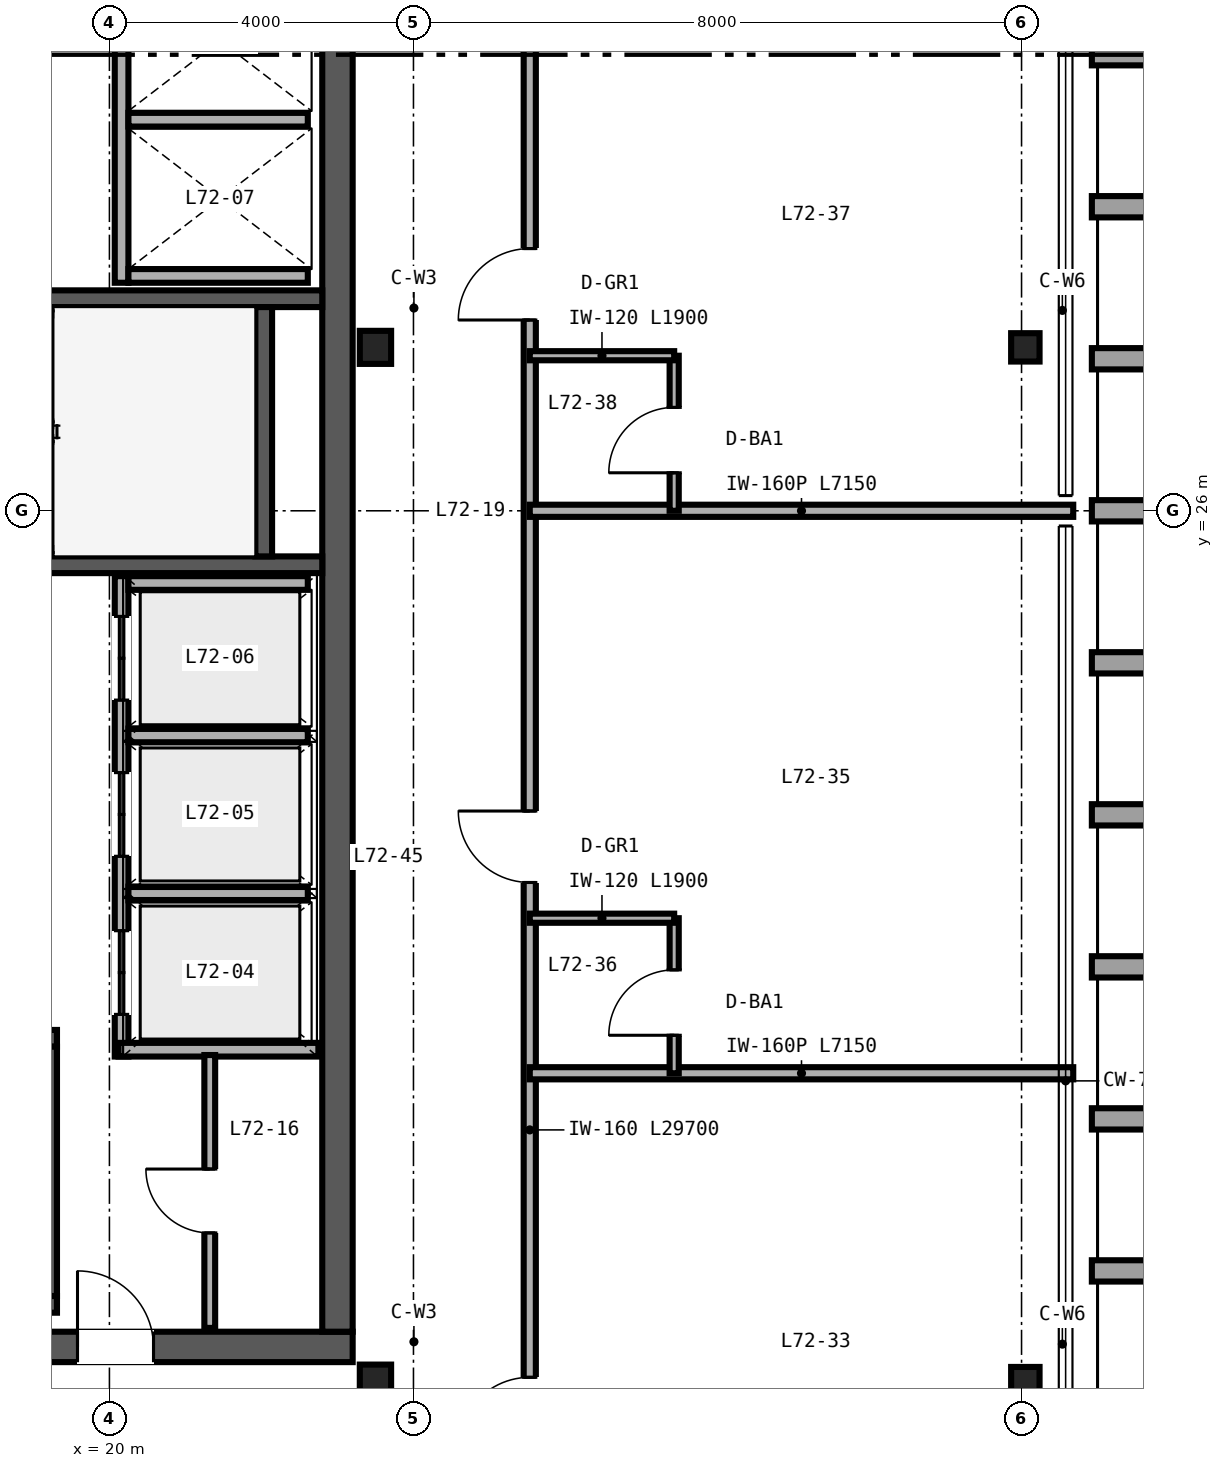
"""IFC4 building model, lengths in metres.
Left out: names, types, materials, properties, quantities, classifications, styles, units other than length and angle.
Written with IfcOpenShell. Run it as: python <this file> out.ifc"""

import sys

from ifc_helpers import new_model, si_unit, direction, frame, frame_2d, origin, origin_2d, place, context, subcontext, project, spatial, rectangle, i_section, extrude, source, transform, mapped, element, fill, save


model = new_model("IFC4")
c1 = context("Model", 3, precision=1e-05, world=origin(), true_north=direction((0.0, 1.0)))
c2 = subcontext(c1, "Body", "Model", "MODEL_VIEW")
j1 = project(units=[si_unit("LENGTHUNIT", "METRE"), si_unit("PLANEANGLEUNIT", "RADIAN")], contexts=[c1])
p1 = place(None, origin())
s1 = spatial("IfcSite", under=j1, at=p1, CompositionType="ELEMENT")
p2 = place(p1, origin())
s2 = spatial("IfcBuilding", under=s1, at=p2, CompositionType="ELEMENT")
p3 = place(p2, frame((0.0, 0.0, 283.2)))
s3 = spatial("IfcBuildingStorey", under=s2, at=p3, CompositionType="ELEMENT", Elevation=283.2)
p4 = place(p3, frame((10.8, 15.0, 0.0), z_axis=(0.0, 0.0, 1.0), x_axis=(1.0, 0.0, 0.0)))
e1 = element("IfcWall", 1, at=p4, inside=s3, PredefinedType="SHEAR", context=c2, shape_type="SweptSolid", body=[
    extrude(rectangle(XDim=12.4, YDim=0.4, at=frame_2d((6.2, 0.0))), origin(), (0.0, 0.0, 1.0), 3.38),
])
p5 = place(p4, frame((8.78, 0.0, 0.0)))
e2 = element("IfcOpeningElement", 2, at=p5, cuts=e1, PredefinedType="OPENING", context=c2, shape_type="SweptSolid", body=[
    extrude(rectangle(XDim=1.0, YDim=2.15, at=frame_2d((0.5, 1.075))), frame((0.0, 0.21, 0.0), z_axis=(0.0, -1.0, 0.0), x_axis=(1.0, 0.0, 0.0)), (0.0, 0.0, 1.0), 0.42),
])
p6 = place(p3, frame((23.0, 15.2, 0.0), z_axis=(0.0, 0.0, 1.0), x_axis=(0.0, 1.0, 0.0)))
e3 = element("IfcWall", 3, at=p6, inside=s3, PredefinedType="SHEAR", context=c2, shape_type="SweptSolid", body=[
    extrude(rectangle(XDim=21.6, YDim=0.4, at=frame_2d((10.8, 0.0))), origin(), (0.0, 0.0, 1.0), 3.38),
])
p7 = place(p3, frame((11.2, 15.56, 0.0), z_axis=(0.0, 0.0, 1.0), x_axis=(1.0, 0.0, 0.0)))
e4 = element("IfcWall", 4, at=p7, inside=s3, PredefinedType="SHEAR", context=c2, shape_type="SweptSolid", body=[
    extrude(rectangle(XDim=8.11, YDim=0.22, at=frame_2d((4.055, 0.0))), origin(), (0.0, 0.0, 1.0), 3.4),
])
p8 = place(p3, frame((11.2, 19.06, 0.0), z_axis=(0.0, 0.0, 1.0), x_axis=(1.0, 0.0, 0.0)))
e5 = element("IfcWall", 5, at=p8, inside=s3, PredefinedType="SHEAR", context=c2, shape_type="SweptSolid", body=[
    extrude(rectangle(XDim=8.11, YDim=0.22, at=frame_2d((4.055, 0.0))), origin(), (0.0, 0.0, 1.0), 3.4),
])
p9 = place(p8, frame((0.72, 0.0, 0.0)))
e6 = element("IfcOpeningElement", 6, at=p9, cuts=e5, PredefinedType="OPENING", context=c2, shape_type="SweptSolid", body=[
    extrude(rectangle(XDim=1.05, YDim=2.15, at=frame_2d((0.525, 1.075))), frame((0.0, 0.12, 0.0), z_axis=(0.0, -1.0, 0.0), x_axis=(1.0, 0.0, 0.0)), (0.0, 0.0, 1.0), 0.24),
])
p10 = place(p3, frame((19.2, 15.67, 0.0), z_axis=(0.0, 0.0, 1.0), x_axis=(0.0, 1.0, 0.0)))
e7 = element("IfcWall", 7, at=p10, inside=s3, PredefinedType="SHEAR", context=c2, shape_type="SweptSolid", body=[
    extrude(rectangle(XDim=3.28, YDim=0.22, at=frame_2d((1.64, 0.0))), origin(), (0.0, 0.0, 1.0), 3.4),
])
p11 = place(p3, frame((14.18, 25.29, 0.0), z_axis=(0.0, 0.0, 1.0), x_axis=(1.0, 0.0, 0.0)))
e8 = element("IfcWall", 8, at=p11, inside=s3, PredefinedType="SHEAR", context=c2, shape_type="SweptSolid", body=[
    extrude(rectangle(XDim=8.62, YDim=0.22, at=frame_2d((4.31, 0.0))), origin(), (0.0, 0.0, 1.0), 3.4),
])
p12 = place(p11, frame((0.47, 0.0, 0.0)))
e9 = element("IfcOpeningElement", 9, at=p12, cuts=e8, PredefinedType="OPENING", context=c2, shape_type="SweptSolid", body=[
    extrude(rectangle(XDim=1.05, YDim=2.15, at=frame_2d((0.525, 1.075))), frame((0.0, 0.12, 0.0), z_axis=(0.0, -1.0, 0.0), x_axis=(1.0, 0.0, 0.0)), (0.0, 0.0, 1.0), 0.24),
])
p13 = place(p3, frame((14.18, 28.79, 0.0), z_axis=(0.0, 0.0, 1.0), x_axis=(1.0, 0.0, 0.0)))
e10 = element("IfcWall", 10, at=p13, inside=s3, PredefinedType="SHEAR", context=c2, shape_type="SweptSolid", body=[
    extrude(rectangle(XDim=8.62, YDim=0.22, at=frame_2d((4.31, 0.0))), origin(), (0.0, 0.0, 1.0), 3.4),
])
p14 = place(p3, frame((22.03, 25.4, 0.0), z_axis=(0.0, 0.0, 1.0), x_axis=(0.0, 1.0, 0.0)))
e11 = element("IfcWall", 11, at=p14, inside=s3, PredefinedType="SHEAR", context=c2, shape_type="SweptSolid", body=[
    extrude(rectangle(XDim=3.28, YDim=0.22, at=frame_2d((1.64, 0.0))), origin(), (0.0, 0.0, 1.0), 3.4),
])
m1 = source(origin(), c2, "Body", "SweptSolid", [
    extrude(i_section(OverallWidth=0.412, OverallDepth=0.435, WebThickness=0.036, FlangeThickness=0.057, FilletRadius=0.025, at=origin_2d()), origin(), (0.0, 0.0, 1.0), 3.38),
])
for number, where, z_axis, x_axis in (
    (12, (23.5, 14.55, 0.0), (0.0, 0.0, 1.0), (1.0, 0.0, 0.0)),
    (13, (23.5, 28.15, 0.0), (0.0, 0.0, 1.0), (1.0, 0.0, 0.0)),
):
    element("IfcColumn", number, at=place(p3, frame(where, z_axis=z_axis, x_axis=x_axis)), inside=s3, PredefinedType="COLUMN", context=c2, shape_type="MappedRepresentation", body=[
        mapped(m1, transform((0.0, 0.0, 0.0), scale=1.0)),
    ])
m2 = source(origin(), c2, "Body", "SweptSolid", [
    extrude(i_section(OverallWidth=0.374, OverallDepth=0.373, WebThickness=0.016, FlangeThickness=0.026, FilletRadius=0.025, at=origin_2d()), origin(), (0.0, 0.0, 1.0), 3.38),
])
for number, where, z_axis, x_axis in (
    (14, (32.05, 14.55, 0.0), (0.0, 0.0, 1.0), (1.0, 0.0, 0.0)),
    (15, (32.05, 28.15, 0.0), (0.0, 0.0, 1.0), (1.0, 0.0, 0.0)),
):
    element("IfcColumn", number, at=place(p3, frame(where, z_axis=z_axis, x_axis=x_axis)), inside=s3, PredefinedType="COLUMN", context=c2, shape_type="MappedRepresentation", body=[
        mapped(m2, transform((0.0, 0.0, 0.0), scale=1.0)),
    ])
p15 = place(p3, frame((20.16, 18.82, 0.0), z_axis=(0.0, 0.0, 1.0), x_axis=(0.0, 1.0, 0.0)))
e16 = element("IfcWall", 16, at=p15, inside=s3, PredefinedType="SOLIDWALL", context=c2, shape_type="SweptSolid", body=[
    extrude(rectangle(XDim=6.32, YDim=0.18, at=frame_2d((3.16, 0.0))), origin(), (0.0, 0.0, 1.0), 2.48),
])
p16 = place(p15, frame((0.555, 0.0, 0.0)))
e17 = element("IfcOpeningElement", 17, at=p16, cuts=e16, PredefinedType="OPENING", context=c2, shape_type="SweptSolid", body=[
    extrude(rectangle(XDim=1.1, YDim=2.2, at=frame_2d((0.55, 1.1))), frame((0.0, 0.1, 0.0), z_axis=(0.0, -1.0, 0.0), x_axis=(1.0, 0.0, 0.0)), (0.0, 0.0, 1.0), 0.2),
])
p17 = place(p15, frame((2.635, 0.0, 0.0)))
e18 = element("IfcOpeningElement", 18, at=p17, cuts=e16, PredefinedType="OPENING", context=c2, shape_type="SweptSolid", body=[
    extrude(rectangle(XDim=1.1, YDim=2.2, at=frame_2d((0.55, 1.1))), frame((0.0, 0.1, 0.0), z_axis=(0.0, -1.0, 0.0), x_axis=(1.0, 0.0, 0.0)), (0.0, 0.0, 1.0), 0.2),
])
p18 = place(p15, frame((4.69, 0.0, 0.0)))
e19 = element("IfcOpeningElement", 19, at=p18, cuts=e16, PredefinedType="OPENING", context=c2, shape_type="SweptSolid", body=[
    extrude(rectangle(XDim=1.1, YDim=2.2, at=frame_2d((0.55, 1.1))), frame((0.0, 0.1, 0.0), z_axis=(0.0, -1.0, 0.0), x_axis=(1.0, 0.0, 0.0)), (0.0, 0.0, 1.0), 0.2),
])
p19 = place(p3, frame((20.12, 18.91, 0.0), z_axis=(0.0, 0.0, 1.0), x_axis=(1.0, 0.0, 0.0)))
e20 = element("IfcWall", 20, at=p19, inside=s3, PredefinedType="SOLIDWALL", context=c2, shape_type="SweptSolid", body=[
    extrude(rectangle(XDim=2.63, YDim=0.18, at=frame_2d((1.315, 0.0))), origin(), (0.0, 0.0, 1.0), 3.38),
])
p20 = place(p3, frame((20.25, 25.05, 0.0), z_axis=(0.0, 0.0, 1.0), x_axis=(1.0, 0.0, 0.0)))
e21 = element("IfcWall", 21, at=p20, inside=s3, PredefinedType="SOLIDWALL", context=c2, shape_type="SweptSolid", body=[
    extrude(rectangle(XDim=2.36, YDim=0.18, at=frame_2d((1.18, 0.0))), origin(), (0.0, 0.0, 1.0), 3.38),
])
p21 = place(p3, frame((20.25, 20.965, 0.0), z_axis=(0.0, 0.0, 1.0), x_axis=(1.0, 0.0, 0.0)))
e22 = element("IfcWall", 22, at=p21, inside=s3, PredefinedType="SOLIDWALL", context=c2, shape_type="SweptSolid", body=[
    extrude(rectangle(XDim=2.36, YDim=0.18, at=frame_2d((1.18, 0.0))), origin(), (0.0, 0.0, 1.0), 2.48),
])
p22 = place(p3, frame((20.25, 23.045, 0.0), z_axis=(0.0, 0.0, 1.0), x_axis=(1.0, 0.0, 0.0)))
e23 = element("IfcWall", 23, at=p22, inside=s3, PredefinedType="SOLIDWALL", context=c2, shape_type="SweptSolid", body=[
    extrude(rectangle(XDim=2.36, YDim=0.18, at=frame_2d((1.18, 0.0))), origin(), (0.0, 0.0, 1.0), 3.38),
])
p23 = place(p3, frame((20.16, 29.0, 0.0), z_axis=(0.0, 0.0, 1.0), x_axis=(0.0, 1.0, 0.0)))
e24 = element("IfcWall", 24, at=p23, inside=s3, PredefinedType="SOLIDWALL", context=c2, shape_type="SweptSolid", body=[
    extrude(rectangle(XDim=4.29, YDim=0.18, at=frame_2d((2.145, 0.0))), origin(), (0.0, 0.0, 1.0), 3.38),
])
for number, where, z_axis, x_axis in (
    (25, (20.25, 29.09, 0.0), (0.0, 0.0, 1.0), (1.0, 0.0, 0.0)),
    (26, (20.25, 31.145, 0.0), (0.0, 0.0, 1.0), (1.0, 0.0, 0.0)),
):
    element("IfcWall", number, at=place(p3, frame(where, z_axis=z_axis, x_axis=x_axis)), inside=s3, PredefinedType="SOLIDWALL", context=c2, shape_type="SweptSolid", body=[
        extrude(rectangle(XDim=2.36, YDim=0.18, at=frame_2d((1.18, 0.0))), origin(), (0.0, 0.0, 1.0), 3.38),
    ])
p24 = place(p3, frame((21.32, 15.25, 0.0), z_axis=(0.0, 0.0, 1.0), x_axis=(0.0, 1.0, 0.0)))
e27 = element("IfcWall", 27, at=p24, inside=s3, PredefinedType="PARTITIONING", context=c2, shape_type="SweptSolid", body=[
    extrude(rectangle(XDim=3.59, YDim=0.142, at=frame_2d((1.795, 0.0))), origin(), (0.0, 0.0, 1.0), 3.38),
])
p25 = place(p24, frame((1.25, 0.0, 0.0)))
e28 = element("IfcOpeningElement", 28, at=p25, cuts=e27, PredefinedType="OPENING", context=c2, shape_type="SweptSolid", body=[
    extrude(rectangle(XDim=0.84, YDim=2.1, at=frame_2d((0.42, 1.05))), frame((0.0, 0.081, 0.0), z_axis=(0.0, -1.0, 0.0), x_axis=(1.0, 0.0, 0.0)), (0.0, 0.0, 1.0), 0.162),
])
p26 = place(p3, frame((25.53, 11.15, 0.0), z_axis=(0.0, 0.0, 1.0), x_axis=(0.0, 1.0, 0.0)))
e29 = element("IfcWall", 29, at=p26, inside=s3, PredefinedType="PARTITIONING", context=c2, shape_type="SweptSolid", body=[
    extrude(rectangle(XDim=29.7, YDim=0.16, at=frame_2d((14.85, 0.0))), origin(), (0.0, 0.0, 1.0), 2.524),
])
p27 = place(p26, frame((2.51, 0.0, 0.0)))
e30 = element("IfcOpeningElement", 30, at=p27, cuts=e29, PredefinedType="OPENING", context=c2, shape_type="SweptSolid", body=[
    extrude(rectangle(XDim=0.94, YDim=2.15, at=frame_2d((0.47, 1.075))), frame((0.0, 0.09, 0.0), z_axis=(0.0, -1.0, 0.0), x_axis=(1.0, 0.0, 0.0)), (0.0, 0.0, 1.0), 0.18),
])
p28 = place(p26, frame((9.96, 0.0, 0.0)))
e31 = element("IfcOpeningElement", 31, at=p28, cuts=e29, PredefinedType="OPENING", context=c2, shape_type="SweptSolid", body=[
    extrude(rectangle(XDim=0.94, YDim=2.15, at=frame_2d((0.47, 1.075))), frame((0.0, 0.09, 0.0), z_axis=(0.0, -1.0, 0.0), x_axis=(1.0, 0.0, 0.0)), (0.0, 0.0, 1.0), 0.18),
])
p29 = place(p26, frame((17.36, 0.0, 0.0)))
e32 = element("IfcOpeningElement", 32, at=p29, cuts=e29, PredefinedType="OPENING", context=c2, shape_type="SweptSolid", body=[
    extrude(rectangle(XDim=0.94, YDim=2.15, at=frame_2d((0.47, 1.075))), frame((0.0, 0.09, 0.0), z_axis=(0.0, -1.0, 0.0), x_axis=(1.0, 0.0, 0.0)), (0.0, 0.0, 1.0), 0.18),
])
p30 = place(p26, frame((24.76, 0.0, 0.0)))
e33 = element("IfcOpeningElement", 33, at=p30, cuts=e29, PredefinedType="OPENING", context=c2, shape_type="SweptSolid", body=[
    extrude(rectangle(XDim=0.94, YDim=2.15, at=frame_2d((0.47, 1.075))), frame((0.0, 0.09, 0.0), z_axis=(0.0, -1.0, 0.0), x_axis=(1.0, 0.0, 0.0)), (0.0, 0.0, 1.0), 0.18),
])
for number, where, z_axis, x_axis in (
    (34, (25.53, 18.6, 0.0), (0.0, 0.0, 1.0), (1.0, 0.0, 0.0)),
    (35, (25.53, 26.0, 0.0), (0.0, 0.0, 1.0), (1.0, 0.0, 0.0)),
):
    element("IfcWall", number, at=place(p3, frame(where, z_axis=z_axis, x_axis=x_axis)), inside=s3, PredefinedType="PARTITIONING", context=c2, shape_type="SweptSolid", body=[
        extrude(rectangle(XDim=7.15, YDim=0.16, at=frame_2d((3.575, 0.0))), origin(), (0.0, 0.0, 1.0), 2.601),
    ])
p31 = place(p3, frame((27.43, 18.6, 0.0), z_axis=(0.0, 0.0, 1.0), x_axis=(0.0, 1.0, 0.0)))
e36 = element("IfcWall", 36, at=p31, inside=s3, PredefinedType="PARTITIONING", context=c2, shape_type="SweptSolid", body=[
    extrude(rectangle(XDim=2.04, YDim=0.12, at=frame_2d((1.02, 0.0))), origin(), (0.0, 0.0, 1.0), 3.38),
])
p32 = place(p31, frame((0.5, 0.0, 0.0)))
e37 = element("IfcOpeningElement", 37, at=p32, cuts=e36, PredefinedType="OPENING", context=c2, shape_type="SweptSolid", body=[
    extrude(rectangle(XDim=0.86, YDim=2.1, at=frame_2d((0.43, 1.05))), frame((0.0, 0.07, 0.0), z_axis=(0.0, -1.0, 0.0), x_axis=(1.0, 0.0, 0.0)), (0.0, 0.0, 1.0), 0.14),
])
p33 = place(p3, frame((25.53, 20.64, 0.0), z_axis=(0.0, 0.0, 1.0), x_axis=(1.0, 0.0, 0.0)))
e38 = element("IfcWall", 38, at=p33, inside=s3, PredefinedType="PARTITIONING", context=c2, shape_type="SweptSolid", body=[
    extrude(rectangle(XDim=1.9, YDim=0.12, at=frame_2d((0.95, 0.0))), origin(), (0.0, 0.0, 1.0), 3.38),
])
p34 = place(p3, frame((27.43, 26.0, 0.0), z_axis=(0.0, 0.0, 1.0), x_axis=(0.0, 1.0, 0.0)))
e39 = element("IfcWall", 39, at=p34, inside=s3, PredefinedType="PARTITIONING", context=c2, shape_type="SweptSolid", body=[
    extrude(rectangle(XDim=2.04, YDim=0.12, at=frame_2d((1.02, 0.0))), origin(), (0.0, 0.0, 1.0), 2.524),
])
p35 = place(p34, frame((0.5, 0.0, 0.0)))
e40 = element("IfcOpeningElement", 40, at=p35, cuts=e39, PredefinedType="OPENING", context=c2, shape_type="SweptSolid", body=[
    extrude(rectangle(XDim=0.86, YDim=2.1, at=frame_2d((0.43, 1.05))), frame((0.0, 0.07, 0.0), z_axis=(0.0, -1.0, 0.0), x_axis=(1.0, 0.0, 0.0)), (0.0, 0.0, 1.0), 0.14),
])
p36 = place(p3, frame((25.53, 28.04, 0.0), z_axis=(0.0, 0.0, 1.0), x_axis=(1.0, 0.0, 0.0)))
e41 = element("IfcWall", 41, at=p36, inside=s3, PredefinedType="PARTITIONING", context=c2, shape_type="SweptSolid", body=[
    extrude(rectangle(XDim=1.9, YDim=0.12, at=frame_2d((0.95, 0.0))), origin(), (0.0, 0.0, 1.0), 2.524),
])
m3 = source(origin(), c2, "Body", "SweptSolid", [
    extrude(rectangle(XDim=1.1, YDim=2.2, at=frame_2d((0.55, 1.1))), frame((0.0, 0.025, 0.0), z_axis=(0.0, -1.0, 0.0), x_axis=(1.0, 0.0, 0.0)), (0.0, 0.0, 1.0), 0.05),
])
p37 = place(p16, origin())
e42 = element("IfcDoor", 42, at=p37, inside=s3, OperationType="DOUBLE_DOOR_SLIDING", PredefinedType="DOOR", context=c2, shape_type="MappedRepresentation", body=[
    mapped(m3, transform((0.0, 0.0, 0.0), scale=1.0)),
])
fill(e17, e42)
p38 = place(p17, origin())
e43 = element("IfcDoor", 43, at=p38, inside=s3, OperationType="DOUBLE_DOOR_SLIDING", PredefinedType="DOOR", context=c2, shape_type="MappedRepresentation", body=[
    mapped(m3, transform((0.0, 0.0, 0.0), scale=1.0)),
])
fill(e18, e43)
p39 = place(p18, origin())
e44 = element("IfcDoor", 44, at=p39, inside=s3, OperationType="DOUBLE_DOOR_SLIDING", PredefinedType="DOOR", context=c2, shape_type="MappedRepresentation", body=[
    mapped(m3, transform((0.0, 0.0, 0.0), scale=1.0)),
])
fill(e19, e44)
m4 = source(origin(), c2, "Body", "SweptSolid", [
    extrude(rectangle(XDim=0.84, YDim=2.1, at=frame_2d((0.42, 1.05))), frame((0.0, 0.025, 0.0), z_axis=(0.0, -1.0, 0.0), x_axis=(1.0, 0.0, 0.0)), (0.0, 0.0, 1.0), 0.05),
])
p40 = place(p25, origin())
e45 = element("IfcDoor", 45, at=p40, inside=s3, OperationType="SINGLE_SWING_RIGHT", PredefinedType="DOOR", context=c2, shape_type="MappedRepresentation", body=[
    mapped(m4, transform((0.0, 0.0, 0.0), scale=1.0)),
])
fill(e28, e45)
m5 = source(origin(), c2, "Body", "SweptSolid", [
    extrude(rectangle(XDim=1.0, YDim=2.15, at=frame_2d((0.5, 1.075))), frame((0.0, 0.025, 0.0), z_axis=(0.0, -1.0, 0.0), x_axis=(1.0, 0.0, 0.0)), (0.0, 0.0, 1.0), 0.05),
])
p41 = place(p5, origin())
e46 = element("IfcDoor", 46, at=p41, inside=s3, OperationType="SINGLE_SWING_LEFT", PredefinedType="DOOR", context=c2, shape_type="MappedRepresentation", body=[
    mapped(m5, transform((0.0, 0.0, 0.0), scale=1.0)),
])
fill(e2, e46)
m6 = source(origin(), c2, "Body", "SweptSolid", [
    extrude(rectangle(XDim=0.94, YDim=2.15, at=frame_2d((0.47, 1.075))), frame((0.0, 0.025, 0.0), z_axis=(0.0, -1.0, 0.0), x_axis=(1.0, 0.0, 0.0)), (0.0, 0.0, 1.0), 0.05),
])
p42 = place(p27, origin())
e47 = element("IfcDoor", 47, at=p42, inside=s3, OperationType="SINGLE_SWING_LEFT", PredefinedType="DOOR", context=c2, shape_type="MappedRepresentation", body=[
    mapped(m6, transform((0.0, 0.0, 0.0), scale=1.0)),
])
fill(e30, e47)
m7 = source(origin(), c2, "Body", "SweptSolid", [
    extrude(rectangle(XDim=0.86, YDim=2.1, at=frame_2d((0.43, 1.05))), frame((0.0, 0.025, 0.0), z_axis=(0.0, -1.0, 0.0), x_axis=(1.0, 0.0, 0.0)), (0.0, 0.0, 1.0), 0.05),
])
p43 = place(p32, origin())
e48 = element("IfcDoor", 48, at=p43, inside=s3, OperationType="SINGLE_SWING_LEFT", PredefinedType="DOOR", context=c2, shape_type="MappedRepresentation", body=[
    mapped(m7, transform((0.0, 0.0, 0.0), scale=1.0)),
])
fill(e37, e48)
p44 = place(p28, origin())
e49 = element("IfcDoor", 49, at=p44, inside=s3, OperationType="SINGLE_SWING_RIGHT", PredefinedType="DOOR", context=c2, shape_type="MappedRepresentation", body=[
    mapped(m6, transform((0.0, 0.0, 0.0), scale=1.0)),
])
fill(e31, e49)
p45 = place(p35, origin())
e50 = element("IfcDoor", 50, at=p45, inside=s3, OperationType="SINGLE_SWING_LEFT", PredefinedType="DOOR", context=c2, shape_type="MappedRepresentation", body=[
    mapped(m7, transform((0.0, 0.0, 0.0), scale=1.0)),
])
fill(e40, e50)
p46 = place(p29, origin())
e51 = element("IfcDoor", 51, at=p46, inside=s3, OperationType="SINGLE_SWING_LEFT", PredefinedType="DOOR", context=c2, shape_type="MappedRepresentation", body=[
    mapped(m6, transform((0.0, 0.0, 0.0), scale=1.0)),
])
fill(e32, e51)
save(model, sys.argv[1])
